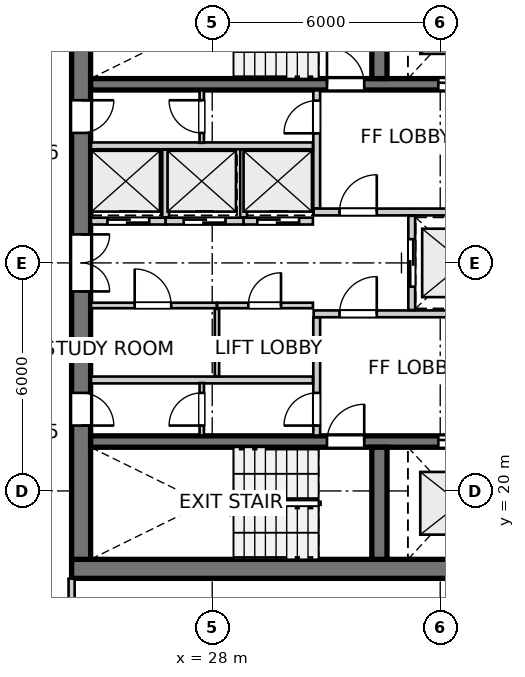
"""IFC4 building model, lengths in metres.
Left out: names, types, materials, properties, quantities, classifications, styles, units other than length and angle.
Written with IfcOpenShell. Run it as: python <this file> out.ifc"""

import sys

from ifc_helpers import new_model, si_unit, direction, frame, frame_2d, origin, place, context, subcontext, project, spatial, rectangle, extrude, source, transform, mapped, element, fill, save


model = new_model("IFC4")
c1 = context("Model", 3, precision=1e-05, world=origin(), true_north=direction((0.0, 1.0)))
c2 = subcontext(c1, "Body", "Model", "MODEL_VIEW")
j1 = project(units=[si_unit("LENGTHUNIT", "METRE"), si_unit("PLANEANGLEUNIT", "RADIAN")], contexts=[c1])
p1 = place(None, origin())
s1 = spatial("IfcSite", under=j1, at=p1, CompositionType="ELEMENT")
p2 = place(p1, origin())
s2 = spatial("IfcBuilding", under=s1, at=p2, CompositionType="ELEMENT")
p3 = place(p2, frame((0.0, 0.0, 211.6)))
s3 = spatial("IfcBuildingStorey", under=s2, at=p3, CompositionType="ELEMENT", Elevation=211.6)
p4 = place(p3, frame((24.3, 17.95, 0.0), z_axis=(0.0, 0.0, 1.0), x_axis=(1.0, 0.0, 0.0)))
e1 = element("IfcWall", 1, at=p4, inside=s3, PredefinedType="SHEAR", context=c2, shape_type="SweptSolid", body=[
    extrude(rectangle(XDim=12.1, YDim=0.5, at=frame_2d((6.05, 0.0))), origin(), (0.0, 0.0, 1.0), 2.96),
])
p5 = place(p3, frame((24.55, 33.8, 0.0), z_axis=(0.0, 0.0, 1.0), x_axis=(0.0, -1.0, 0.0)))
e2 = element("IfcWall", 2, at=p5, inside=s3, PredefinedType="SHEAR", context=c2, shape_type="SweptSolid", body=[
    extrude(rectangle(XDim=15.6, YDim=0.5, at=frame_2d((7.8, 0.0))), origin(), (0.0, 0.0, 1.0), 2.96),
])
p6 = place(p5, frame((7.05, 0.0, 0.0)))
e3 = element("IfcOpeningElement", 3, at=p6, cuts=e2, PredefinedType="OPENING", context=c2, shape_type="SweptSolid", body=[
    extrude(rectangle(XDim=1.5, YDim=2.15, at=frame_2d((0.75, 1.075))), frame((0.0, 0.26, 0.0), z_axis=(0.0, -1.0, 0.0), x_axis=(1.0, 0.0, 0.0)), (0.0, 0.0, 1.0), 0.52),
])
p7 = place(p5, frame((3.52, 0.0, 0.0)))
e4 = element("IfcOpeningElement", 4, at=p7, cuts=e2, PredefinedType="OPENING", context=c2, shape_type="SweptSolid", body=[
    extrude(rectangle(XDim=0.86, YDim=2.05, at=frame_2d((0.43, 1.025))), frame((0.0, 0.26, 0.0), z_axis=(0.0, -1.0, 0.0), x_axis=(1.0, 0.0, 0.0)), (0.0, 0.0, 1.0), 0.52),
])
p8 = place(p5, frame((11.22, 0.0, 0.0)))
e5 = element("IfcOpeningElement", 5, at=p8, cuts=e2, PredefinedType="OPENING", context=c2, shape_type="SweptSolid", body=[
    extrude(rectangle(XDim=0.86, YDim=2.05, at=frame_2d((0.43, 1.025))), frame((0.0, 0.26, 0.0), z_axis=(0.0, -1.0, 0.0), x_axis=(1.0, 0.0, 0.0)), (0.0, 0.0, 1.0), 0.52),
])
p9 = place(p3, frame((24.8, 21.3, 0.0), z_axis=(0.0, 0.0, 1.0), x_axis=(1.0, 0.0, 0.0)))
e6 = element("IfcWall", 6, at=p9, inside=s3, PredefinedType="SHEAR", context=c2, shape_type="SweptSolid", body=[
    extrude(rectangle(XDim=11.1, YDim=0.3, at=frame_2d((5.55, 0.0))), origin(), (0.0, 0.0, 1.0), 2.96),
])
p10 = place(p9, frame((6.22, 0.0, 0.0)))
e7 = element("IfcOpeningElement", 7, at=p10, cuts=e6, PredefinedType="OPENING", context=c2, shape_type="SweptSolid", body=[
    extrude(rectangle(XDim=0.98, YDim=2.15, at=frame_2d((0.49, 1.075))), frame((0.0, 0.16, 0.0), z_axis=(0.0, -1.0, 0.0), x_axis=(1.0, 0.0, 0.0)), (0.0, 0.0, 1.0), 0.32),
])
p11 = place(p9, frame((9.15, 0.0, 0.0)))
e8 = element("IfcOpeningElement", 8, at=p11, cuts=e6, PredefinedType="OPENING", context=c2, shape_type="SweptSolid", body=[
    extrude(rectangle(XDim=1.15, YDim=2.15, at=frame_2d((0.575, 1.075))), frame((0.0, 0.16, 0.0), z_axis=(0.0, -1.0, 0.0), x_axis=(1.0, 0.0, 0.0)), (0.0, 0.0, 1.0), 0.32),
])
p12 = place(p3, frame((32.4, 18.2, 0.0), z_axis=(0.0, 0.0, 1.0), x_axis=(0.0, 1.0, 0.0)))
e9 = element("IfcWall", 9, at=p12, inside=s3, PredefinedType="SHEAR", context=c2, shape_type="SweptSolid", body=[
    extrude(rectangle(XDim=2.95, YDim=0.4, at=frame_2d((1.475, 0.0))), origin(), (0.0, 0.0, 1.0), 2.96),
])
p13 = place(p3, frame((24.8, 30.7, 0.0), z_axis=(0.0, 0.0, 1.0), x_axis=(1.0, 0.0, 0.0)))
e10 = element("IfcWall", 10, at=p13, inside=s3, PredefinedType="SHEAR", context=c2, shape_type="SweptSolid", body=[
    extrude(rectangle(XDim=11.1, YDim=0.3, at=frame_2d((5.55, 0.0))), origin(), (0.0, 0.0, 1.0), 2.96),
])
p14 = place(p13, frame((6.22, 0.0, 0.0)))
e11 = element("IfcOpeningElement", 11, at=p14, cuts=e10, PredefinedType="OPENING", context=c2, shape_type="SweptSolid", body=[
    extrude(rectangle(XDim=0.98, YDim=2.15, at=frame_2d((0.49, 1.075))), frame((0.0, 0.16, 0.0), z_axis=(0.0, -1.0, 0.0), x_axis=(1.0, 0.0, 0.0)), (0.0, 0.0, 1.0), 0.32),
])
p15 = place(p13, frame((9.15, 0.0, 0.0)))
e12 = element("IfcOpeningElement", 12, at=p15, cuts=e10, PredefinedType="OPENING", context=c2, shape_type="SweptSolid", body=[
    extrude(rectangle(XDim=1.15, YDim=2.15, at=frame_2d((0.575, 1.075))), frame((0.0, 0.16, 0.0), z_axis=(0.0, -1.0, 0.0), x_axis=(1.0, 0.0, 0.0)), (0.0, 0.0, 1.0), 0.32),
])
p16 = place(p3, frame((32.4, 30.85, 0.0), z_axis=(0.0, 0.0, 1.0), x_axis=(0.0, 1.0, 0.0)))
e13 = element("IfcWall", 13, at=p16, inside=s3, PredefinedType="SHEAR", context=c2, shape_type="SweptSolid", body=[
    extrude(rectangle(XDim=2.95, YDim=0.4, at=frame_2d((1.475, 0.0))), origin(), (0.0, 0.0, 1.0), 2.96),
])
p17 = place(p3, frame((30.75, 21.46, 0.0), z_axis=(0.0, 0.0, 1.0), x_axis=(0.0, 1.0, 0.0)))
e14 = element("IfcWall", 14, at=p17, inside=s3, PredefinedType="PARTITIONING", context=c2, shape_type="SweptSolid", body=[
    extrude(rectangle(XDim=3.11, YDim=0.18, at=frame_2d((1.555, 0.0))), origin(), (0.0, 0.0, 1.0), 2.96),
])
p18 = place(p17, frame((0.26, 0.0, 0.0)))
e15 = element("IfcOpeningElement", 15, at=p18, cuts=e14, PredefinedType="OPENING", context=c2, shape_type="SweptSolid", body=[
    extrude(rectangle(XDim=0.86, YDim=2.05, at=frame_2d((0.43, 1.025))), frame((0.0, 0.1, 0.0), z_axis=(0.0, -1.0, 0.0), x_axis=(1.0, 0.0, 0.0)), (0.0, 0.0, 1.0), 0.2),
])
p19 = place(p3, frame((30.67, 24.66, 0.0), z_axis=(0.0, 0.0, 1.0), x_axis=(1.0, 0.0, 0.0)))
e16 = element("IfcWall", 16, at=p19, inside=s3, PredefinedType="PARTITIONING", context=c2, shape_type="SweptSolid", body=[
    extrude(rectangle(XDim=5.22, YDim=0.18, at=frame_2d((2.61, 0.0))), origin(), (0.0, 0.0, 1.0), 2.96),
])
p20 = place(p19, frame((0.68, 0.0, 0.0)))
e17 = element("IfcOpeningElement", 17, at=p20, cuts=e16, PredefinedType="OPENING", context=c2, shape_type="SweptSolid", body=[
    extrude(rectangle(XDim=0.98, YDim=2.15, at=frame_2d((0.49, 1.075))), frame((0.0, 0.1, 0.0), z_axis=(0.0, -1.0, 0.0), x_axis=(1.0, 0.0, 0.0)), (0.0, 0.0, 1.0), 0.2),
])
p21 = place(p3, frame((30.75, 27.43, 0.0), z_axis=(0.0, 0.0, 1.0), x_axis=(0.0, 1.0, 0.0)))
e18 = element("IfcWall", 18, at=p21, inside=s3, PredefinedType="PARTITIONING", context=c2, shape_type="SweptSolid", body=[
    extrude(rectangle(XDim=3.11, YDim=0.18, at=frame_2d((1.555, 0.0))), origin(), (0.0, 0.0, 1.0), 2.96),
])
p22 = place(p21, frame((1.98, 0.0, 0.0)))
e19 = element("IfcOpeningElement", 19, at=p22, cuts=e18, PredefinedType="OPENING", context=c2, shape_type="SweptSolid", body=[
    extrude(rectangle(XDim=0.86, YDim=2.05, at=frame_2d((0.43, 1.025))), frame((0.0, 0.1, 0.0), z_axis=(0.0, -1.0, 0.0), x_axis=(1.0, 0.0, 0.0)), (0.0, 0.0, 1.0), 0.2),
])
p23 = place(p3, frame((30.67, 27.34, 0.0), z_axis=(0.0, 0.0, 1.0), x_axis=(1.0, 0.0, 0.0)))
e20 = element("IfcWall", 20, at=p23, inside=s3, PredefinedType="PARTITIONING", context=c2, shape_type="SweptSolid", body=[
    extrude(rectangle(XDim=5.22, YDim=0.18, at=frame_2d((2.61, 0.0))), origin(), (0.0, 0.0, 1.0), 2.96),
])
p24 = place(p23, frame((0.68, 0.0, 0.0)))
e21 = element("IfcOpeningElement", 21, at=p24, cuts=e20, PredefinedType="OPENING", context=c2, shape_type="SweptSolid", body=[
    extrude(rectangle(XDim=0.98, YDim=2.15, at=frame_2d((0.49, 1.075))), frame((0.0, 0.1, 0.0), z_axis=(0.0, -1.0, 0.0), x_axis=(1.0, 0.0, 0.0)), (0.0, 0.0, 1.0), 0.2),
])
p25 = place(p3, frame((33.25, 24.76, 0.0), z_axis=(0.0, 0.0, 1.0), x_axis=(0.0, 1.0, 0.0)))
e22 = element("IfcWall", 22, at=p25, inside=s3, PredefinedType="PARTITIONING", context=c2, shape_type="SweptSolid", body=[
    extrude(rectangle(XDim=2.48, YDim=0.18, at=frame_2d((1.24, 0.0))), origin(), (0.0, 0.0, 1.0), 2.96),
])
p26 = place(p25, frame((0.615, 0.0, 0.0)))
e23 = element("IfcOpeningElement", 23, at=p26, cuts=e22, PredefinedType="OPENING", context=c2, shape_type="SweptSolid", body=[
    extrude(rectangle(XDim=1.25, YDim=2.15, at=frame_2d((0.625, 1.075))), frame((0.0, 0.1, 0.0), z_axis=(0.0, -1.0, 0.0), x_axis=(1.0, 0.0, 0.0)), (0.0, 0.0, 1.0), 0.2),
])
p27 = place(p3, frame((24.81, 22.92, 0.0), z_axis=(0.0, 0.0, 1.0), x_axis=(1.0, 0.0, 0.0)))
e24 = element("IfcWall", 24, at=p27, inside=s3, PredefinedType="PARTITIONING", context=c2, shape_type="SweptSolid", body=[
    extrude(rectangle(XDim=5.84, YDim=0.18, at=frame_2d((2.92, 0.0))), origin(), (0.0, 0.0, 1.0), 2.96),
])
p28 = place(p3, frame((24.81, 24.88, 0.0), z_axis=(0.0, 0.0, 1.0), x_axis=(1.0, 0.0, 0.0)))
e25 = element("IfcWall", 25, at=p28, inside=s3, PredefinedType="PARTITIONING", context=c2, shape_type="SweptSolid", body=[
    extrude(rectangle(XDim=3.31, YDim=0.145, at=frame_2d((1.655, 0.0))), origin(), (0.0, 0.0, 1.0), 2.96),
])
p29 = place(p28, frame((1.15, 0.0, 0.0)))
e26 = element("IfcOpeningElement", 26, at=p29, cuts=e25, PredefinedType="OPENING", context=c2, shape_type="SweptSolid", body=[
    extrude(rectangle(XDim=0.96, YDim=2.1, at=frame_2d((0.48, 1.05))), frame((0.0, 0.083, 0.0), z_axis=(0.0, -1.0, 0.0), x_axis=(1.0, 0.0, 0.0)), (0.0, 0.0, 1.0), 0.165),
])
p30 = place(p3, frame((28.13, 24.88, 0.0), z_axis=(0.0, 0.0, 1.0), x_axis=(1.0, 0.0, 0.0)))
e27 = element("IfcWall", 27, at=p30, inside=s3, PredefinedType="PARTITIONING", context=c2, shape_type="SweptSolid", body=[
    extrude(rectangle(XDim=2.52, YDim=0.145, at=frame_2d((1.26, 0.0))), origin(), (0.0, 0.0, 1.0), 2.96),
])
p31 = place(p30, frame((0.82, 0.0, 0.0)))
e28 = element("IfcOpeningElement", 28, at=p31, cuts=e27, PredefinedType="OPENING", context=c2, shape_type="SweptSolid", body=[
    extrude(rectangle(XDim=0.86, YDim=2.05, at=frame_2d((0.43, 1.025))), frame((0.0, 0.083, 0.0), z_axis=(0.0, -1.0, 0.0), x_axis=(1.0, 0.0, 0.0)), (0.0, 0.0, 1.0), 0.165),
])
p32 = place(p3, frame((28.125, 23.02, 0.0), z_axis=(0.0, 0.0, 1.0), x_axis=(0.0, 1.0, 0.0)))
e29 = element("IfcWall", 29, at=p32, inside=s3, PredefinedType="PARTITIONING", context=c2, shape_type="SweptSolid", body=[
    extrude(rectangle(XDim=1.77, YDim=0.115, at=frame_2d((0.885, 0.0))), origin(), (0.0, 0.0, 1.0), 2.96),
])
p33 = place(p3, frame((24.81, 29.08, 0.0), z_axis=(0.0, 0.0, 1.0), x_axis=(1.0, 0.0, 0.0)))
e30 = element("IfcWall", 30, at=p33, inside=s3, PredefinedType="PARTITIONING", context=c2, shape_type="SweptSolid", body=[
    extrude(rectangle(XDim=5.84, YDim=0.18, at=frame_2d((2.92, 0.0))), origin(), (0.0, 0.0, 1.0), 2.96),
])
p34 = place(p3, frame((24.81, 27.1, 0.0), z_axis=(0.0, 0.0, 1.0), x_axis=(1.0, 0.0, 0.0)))
e31 = element("IfcWall", 31, at=p34, inside=s3, PredefinedType="PARTITIONING", context=c2, shape_type="SweptSolid", body=[
    extrude(rectangle(XDim=1.965, YDim=0.18, at=frame_2d((0.982, 0.0))), origin(), (0.0, 0.0, 1.0), 2.96),
])
p35 = place(p34, frame((0.433, 0.0, 0.0)))
e32 = element("IfcOpeningElement", 32, at=p35, cuts=e31, PredefinedType="OPENING", context=c2, shape_type="SweptSolid", body=[
    extrude(rectangle(XDim=1.1, YDim=2.15, at=frame_2d((0.55, 1.075))), frame((0.0, 0.1, 0.0), z_axis=(0.0, -1.0, 0.0), x_axis=(1.0, 0.0, 0.0)), (0.0, 0.0, 1.0), 0.2),
])
p36 = place(p3, frame((26.775, 27.1, 0.0), z_axis=(0.0, 0.0, 1.0), x_axis=(1.0, 0.0, 0.0)))
e33 = element("IfcWall", 33, at=p36, inside=s3, PredefinedType="PARTITIONING", context=c2, shape_type="SweptSolid", body=[
    extrude(rectangle(XDim=2.05, YDim=0.18, at=frame_2d((1.025, 0.0))), origin(), (0.0, 0.0, 1.0), 2.96),
])
p37 = place(p36, frame((0.475, 0.0, 0.0)))
e34 = element("IfcOpeningElement", 34, at=p37, cuts=e33, PredefinedType="OPENING", context=c2, shape_type="SweptSolid", body=[
    extrude(rectangle(XDim=1.1, YDim=2.15, at=frame_2d((0.55, 1.075))), frame((0.0, 0.1, 0.0), z_axis=(0.0, -1.0, 0.0), x_axis=(1.0, 0.0, 0.0)), (0.0, 0.0, 1.0), 0.2),
])
p38 = place(p3, frame((26.775, 27.2, 0.0), z_axis=(0.0, 0.0, 1.0), x_axis=(0.0, 1.0, 0.0)))
e35 = element("IfcWall", 35, at=p38, inside=s3, PredefinedType="PARTITIONING", context=c2, shape_type="SweptSolid", body=[
    extrude(rectangle(XDim=1.78, YDim=0.18, at=frame_2d((0.89, 0.0))), origin(), (0.0, 0.0, 1.0), 2.96),
])
p39 = place(p3, frame((28.825, 27.1, 0.0), z_axis=(0.0, 0.0, 1.0), x_axis=(1.0, 0.0, 0.0)))
e36 = element("IfcWall", 36, at=p39, inside=s3, PredefinedType="PARTITIONING", context=c2, shape_type="SweptSolid", body=[
    extrude(rectangle(XDim=1.825, YDim=0.18, at=frame_2d((0.913, 0.0))), origin(), (0.0, 0.0, 1.0), 2.96),
])
p40 = place(p39, frame((0.363, 0.0, 0.0)))
e37 = element("IfcOpeningElement", 37, at=p40, cuts=e36, PredefinedType="OPENING", context=c2, shape_type="SweptSolid", body=[
    extrude(rectangle(XDim=1.1, YDim=2.15, at=frame_2d((0.55, 1.075))), frame((0.0, 0.1, 0.0), z_axis=(0.0, -1.0, 0.0), x_axis=(1.0, 0.0, 0.0)), (0.0, 0.0, 1.0), 0.2),
])
p41 = place(p3, frame((28.825, 27.2, 0.0), z_axis=(0.0, 0.0, 1.0), x_axis=(0.0, 1.0, 0.0)))
e38 = element("IfcWall", 38, at=p41, inside=s3, PredefinedType="PARTITIONING", context=c2, shape_type="SweptSolid", body=[
    extrude(rectangle(XDim=1.78, YDim=0.18, at=frame_2d((0.89, 0.0))), origin(), (0.0, 0.0, 1.0), 2.96),
])
p42 = place(p3, frame((27.725, 21.46, 0.0), z_axis=(0.0, 0.0, 1.0), x_axis=(0.0, 1.0, 0.0)))
e39 = element("IfcWall", 39, at=p42, inside=s3, PredefinedType="PARTITIONING", context=c2, shape_type="SweptSolid", body=[
    extrude(rectangle(XDim=1.38, YDim=0.115, at=frame_2d((0.69, 0.0))), origin(), (0.0, 0.0, 1.0), 2.96),
])
p43 = place(p42, frame((0.26, 0.0, 0.0)))
e40 = element("IfcOpeningElement", 40, at=p43, cuts=e39, PredefinedType="OPENING", context=c2, shape_type="SweptSolid", body=[
    extrude(rectangle(XDim=0.86, YDim=2.05, at=frame_2d((0.43, 1.025))), frame((0.0, 0.067, 0.0), z_axis=(0.0, -1.0, 0.0), x_axis=(1.0, 0.0, 0.0)), (0.0, 0.0, 1.0), 0.135),
])
p44 = place(p3, frame((27.725, 29.16, 0.0), z_axis=(0.0, 0.0, 1.0), x_axis=(0.0, 1.0, 0.0)))
e41 = element("IfcWall", 41, at=p44, inside=s3, PredefinedType="PARTITIONING", context=c2, shape_type="SweptSolid", body=[
    extrude(rectangle(XDim=1.38, YDim=0.115, at=frame_2d((0.69, 0.0))), origin(), (0.0, 0.0, 1.0), 2.96),
])
p45 = place(p44, frame((0.26, 0.0, 0.0)))
e42 = element("IfcOpeningElement", 42, at=p45, cuts=e41, PredefinedType="OPENING", context=c2, shape_type="SweptSolid", body=[
    extrude(rectangle(XDim=0.86, YDim=2.05, at=frame_2d((0.43, 1.025))), frame((0.0, 0.067, 0.0), z_axis=(0.0, -1.0, 0.0), x_axis=(1.0, 0.0, 0.0)), (0.0, 0.0, 1.0), 0.135),
])
p46 = place(p3, frame((24.3, 15.002, 0.0), z_axis=(0.0, 0.0, 1.0), x_axis=(0.0, 1.0, 0.0)))
e43 = element("IfcWall", 43, at=p46, inside=s3, PredefinedType="PARTITIONING", context=c2, shape_type="SweptSolid", body=[
    extrude(rectangle(XDim=2.69, YDim=0.16, at=frame_2d((1.345, 0.0))), origin(), (0.0, 0.0, 1.0), 2.96),
])
m1 = source(origin(), c2, "Body", "SweptSolid", [
    extrude(rectangle(XDim=0.98, YDim=2.15, at=frame_2d((0.49, 1.075))), frame((0.0, 0.025, 0.0), z_axis=(0.0, -1.0, 0.0), x_axis=(1.0, 0.0, 0.0)), (0.0, 0.0, 1.0), 0.05),
])
p47 = place(p10, origin())
e44 = element("IfcDoor", 44, at=p47, inside=s3, OperationType="SINGLE_SWING_RIGHT", PredefinedType="DOOR", context=c2, shape_type="MappedRepresentation", body=[
    mapped(m1, transform((0.0, 0.0, 0.0), x_axis=(1.0, 0.0, 0.0), y_axis=(0.0, 1.0, 0.0), z_axis=(0.0, 0.0, 1.0), scale=1.0)),
])
fill(e7, e44)
m2 = source(origin(), c2, "Body", "SweptSolid", [
    extrude(rectangle(XDim=1.15, YDim=2.15, at=frame_2d((0.575, 1.075))), frame((0.0, 0.025, 0.0), z_axis=(0.0, -1.0, 0.0), x_axis=(1.0, 0.0, 0.0)), (0.0, 0.0, 1.0), 0.05),
])
p48 = place(p11, origin())
e45 = element("IfcDoor", 45, at=p48, inside=s3, OperationType="DOUBLE_DOOR_SLIDING", PredefinedType="DOOR", context=c2, shape_type="MappedRepresentation", body=[
    mapped(m2, transform((0.0, 0.0, 0.0), x_axis=(1.0, 0.0, 0.0), y_axis=(0.0, 1.0, 0.0), z_axis=(0.0, 0.0, 1.0), scale=1.0)),
])
fill(e8, e45)
p49 = place(p14, origin())
e46 = element("IfcDoor", 46, at=p49, inside=s3, OperationType="SINGLE_SWING_LEFT", PredefinedType="DOOR", context=c2, shape_type="MappedRepresentation", body=[
    mapped(m1, transform((0.0, 0.0, 0.0), x_axis=(1.0, 0.0, 0.0), y_axis=(0.0, 1.0, 0.0), z_axis=(0.0, 0.0, 1.0), scale=1.0)),
])
fill(e11, e46)
p50 = place(p15, origin())
e47 = element("IfcDoor", 47, at=p50, inside=s3, OperationType="DOUBLE_DOOR_SLIDING", PredefinedType="DOOR", context=c2, shape_type="MappedRepresentation", body=[
    mapped(m2, transform((0.0, 0.0, 0.0), x_axis=(1.0, 0.0, 0.0), y_axis=(0.0, 1.0, 0.0), z_axis=(0.0, 0.0, 1.0), scale=1.0)),
])
fill(e12, e47)
m3 = source(origin(), c2, "Body", "SweptSolid", [
    extrude(rectangle(XDim=1.5, YDim=2.15, at=frame_2d((0.75, 1.075))), frame((0.0, 0.025, 0.0), z_axis=(0.0, -1.0, 0.0), x_axis=(1.0, 0.0, 0.0)), (0.0, 0.0, 1.0), 0.05),
])
p51 = place(p6, origin())
e48 = element("IfcDoor", 48, at=p51, inside=s3, OperationType="DOUBLE_DOOR_SINGLE_SWING", PredefinedType="DOOR", context=c2, shape_type="MappedRepresentation", body=[
    mapped(m3, transform((0.0, 0.0, 0.0), x_axis=(1.0, 0.0, 0.0), y_axis=(0.0, 1.0, 0.0), z_axis=(0.0, 0.0, 1.0), scale=1.0)),
])
fill(e3, e48)
m4 = source(origin(), c2, "Body", "SweptSolid", [
    extrude(rectangle(XDim=0.86, YDim=2.05, at=frame_2d((0.43, 1.025))), frame((0.0, 0.025, 0.0), z_axis=(0.0, -1.0, 0.0), x_axis=(1.0, 0.0, 0.0)), (0.0, 0.0, 1.0), 0.05),
])
p52 = place(p7, origin())
e49 = element("IfcDoor", 49, at=p52, inside=s3, OperationType="SINGLE_SWING_LEFT", PredefinedType="DOOR", context=c2, shape_type="MappedRepresentation", body=[
    mapped(m4, transform((0.0, 0.0, 0.0), x_axis=(1.0, 0.0, 0.0), y_axis=(0.0, 1.0, 0.0), z_axis=(0.0, 0.0, 1.0), scale=1.0)),
])
fill(e4, e49)
p53 = place(p8, origin())
e50 = element("IfcDoor", 50, at=p53, inside=s3, OperationType="SINGLE_SWING_RIGHT", PredefinedType="DOOR", context=c2, shape_type="MappedRepresentation", body=[
    mapped(m4, transform((0.0, 0.0, 0.0), x_axis=(1.0, 0.0, 0.0), y_axis=(0.0, 1.0, 0.0), z_axis=(0.0, 0.0, 1.0), scale=1.0)),
])
fill(e5, e50)
p54 = place(p18, origin())
e51 = element("IfcDoor", 51, at=p54, inside=s3, OperationType="SINGLE_SWING_LEFT", PredefinedType="DOOR", context=c2, shape_type="MappedRepresentation", body=[
    mapped(m4, transform((0.0, 0.0, 0.0), x_axis=(1.0, 0.0, 0.0), y_axis=(0.0, 1.0, 0.0), z_axis=(0.0, 0.0, 1.0), scale=1.0)),
])
fill(e15, e51)
p55 = place(p20, origin())
e52 = element("IfcDoor", 52, at=p55, inside=s3, OperationType="SINGLE_SWING_RIGHT", PredefinedType="DOOR", context=c2, shape_type="MappedRepresentation", body=[
    mapped(m1, transform((0.0, 0.0, 0.0), x_axis=(1.0, 0.0, 0.0), y_axis=(0.0, 1.0, 0.0), z_axis=(0.0, 0.0, 1.0), scale=1.0)),
])
fill(e17, e52)
p56 = place(p22, origin())
e53 = element("IfcDoor", 53, at=p56, inside=s3, OperationType="SINGLE_SWING_LEFT", PredefinedType="DOOR", context=c2, shape_type="MappedRepresentation", body=[
    mapped(m4, transform((0.0, 0.0, 0.0), x_axis=(1.0, 0.0, 0.0), y_axis=(0.0, 1.0, 0.0), z_axis=(0.0, 0.0, 1.0), scale=1.0)),
])
fill(e19, e53)
p57 = place(p24, origin())
e54 = element("IfcDoor", 54, at=p57, inside=s3, OperationType="SINGLE_SWING_RIGHT", PredefinedType="DOOR", context=c2, shape_type="MappedRepresentation", body=[
    mapped(m1, transform((0.0, 0.0, 0.0), x_axis=(1.0, 0.0, 0.0), y_axis=(0.0, 1.0, 0.0), z_axis=(0.0, 0.0, 1.0), scale=1.0)),
])
fill(e21, e54)
m5 = source(origin(), c2, "Body", "SweptSolid", [
    extrude(rectangle(XDim=1.25, YDim=2.15, at=frame_2d((0.625, 1.075))), frame((0.0, 0.025, 0.0), z_axis=(0.0, -1.0, 0.0), x_axis=(1.0, 0.0, 0.0)), (0.0, 0.0, 1.0), 0.05),
])
p58 = place(p26, origin())
e55 = element("IfcDoor", 55, at=p58, inside=s3, OperationType="DOUBLE_DOOR_SLIDING", PredefinedType="DOOR", context=c2, shape_type="MappedRepresentation", body=[
    mapped(m5, transform((0.0, 0.0, 0.0), x_axis=(1.0, 0.0, 0.0), y_axis=(0.0, 1.0, 0.0), z_axis=(0.0, 0.0, 1.0), scale=1.0)),
])
fill(e23, e55)
m6 = source(origin(), c2, "Body", "SweptSolid", [
    extrude(rectangle(XDim=0.96, YDim=2.1, at=frame_2d((0.48, 1.05))), frame((0.0, 0.025, 0.0), z_axis=(0.0, -1.0, 0.0), x_axis=(1.0, 0.0, 0.0)), (0.0, 0.0, 1.0), 0.05),
])
p59 = place(p29, origin())
e56 = element("IfcDoor", 56, at=p59, inside=s3, OperationType="SINGLE_SWING_LEFT", PredefinedType="DOOR", context=c2, shape_type="MappedRepresentation", body=[
    mapped(m6, transform((0.0, 0.0, 0.0), x_axis=(1.0, 0.0, 0.0), y_axis=(0.0, 1.0, 0.0), z_axis=(0.0, 0.0, 1.0), scale=1.0)),
])
fill(e26, e56)
p60 = place(p31, origin())
e57 = element("IfcDoor", 57, at=p60, inside=s3, OperationType="SINGLE_SWING_RIGHT", PredefinedType="DOOR", context=c2, shape_type="MappedRepresentation", body=[
    mapped(m4, transform((0.0, 0.0, 0.0), x_axis=(1.0, 0.0, 0.0), y_axis=(0.0, 1.0, 0.0), z_axis=(0.0, 0.0, 1.0), scale=1.0)),
])
fill(e28, e57)
m7 = source(origin(), c2, "Body", "SweptSolid", [
    extrude(rectangle(XDim=1.1, YDim=2.15, at=frame_2d((0.55, 1.075))), frame((0.0, 0.025, 0.0), z_axis=(0.0, -1.0, 0.0), x_axis=(1.0, 0.0, 0.0)), (0.0, 0.0, 1.0), 0.05),
])
p61 = place(p35, origin())
e58 = element("IfcDoor", 58, at=p61, inside=s3, OperationType="DOUBLE_DOOR_SLIDING", PredefinedType="DOOR", context=c2, shape_type="MappedRepresentation", body=[
    mapped(m7, transform((0.0, 0.0, 0.0), x_axis=(1.0, 0.0, 0.0), y_axis=(0.0, 1.0, 0.0), z_axis=(0.0, 0.0, 1.0), scale=1.0)),
])
fill(e32, e58)
p62 = place(p37, origin())
e59 = element("IfcDoor", 59, at=p62, inside=s3, OperationType="DOUBLE_DOOR_SLIDING", PredefinedType="DOOR", context=c2, shape_type="MappedRepresentation", body=[
    mapped(m7, transform((0.0, 0.0, 0.0), x_axis=(1.0, 0.0, 0.0), y_axis=(0.0, 1.0, 0.0), z_axis=(0.0, 0.0, 1.0), scale=1.0)),
])
fill(e34, e59)
p63 = place(p40, origin())
e60 = element("IfcDoor", 60, at=p63, inside=s3, OperationType="DOUBLE_DOOR_SLIDING", PredefinedType="DOOR", context=c2, shape_type="MappedRepresentation", body=[
    mapped(m7, transform((0.0, 0.0, 0.0), x_axis=(1.0, 0.0, 0.0), y_axis=(0.0, 1.0, 0.0), z_axis=(0.0, 0.0, 1.0), scale=1.0)),
])
fill(e37, e60)
p64 = place(p43, origin())
e61 = element("IfcDoor", 61, at=p64, inside=s3, OperationType="SINGLE_SWING_LEFT", PredefinedType="DOOR", context=c2, shape_type="MappedRepresentation", body=[
    mapped(m4, transform((0.0, 0.0, 0.0), x_axis=(1.0, 0.0, 0.0), y_axis=(0.0, 1.0, 0.0), z_axis=(0.0, 0.0, 1.0), scale=1.0)),
])
fill(e40, e61)
p65 = place(p45, origin())
e62 = element("IfcDoor", 62, at=p65, inside=s3, OperationType="SINGLE_SWING_RIGHT", PredefinedType="DOOR", context=c2, shape_type="MappedRepresentation", body=[
    mapped(m4, transform((0.0, 0.0, 0.0), x_axis=(1.0, 0.0, 0.0), y_axis=(0.0, 1.0, 0.0), z_axis=(0.0, 0.0, 1.0), scale=1.0)),
])
fill(e42, e62)
save(model, sys.argv[1])
